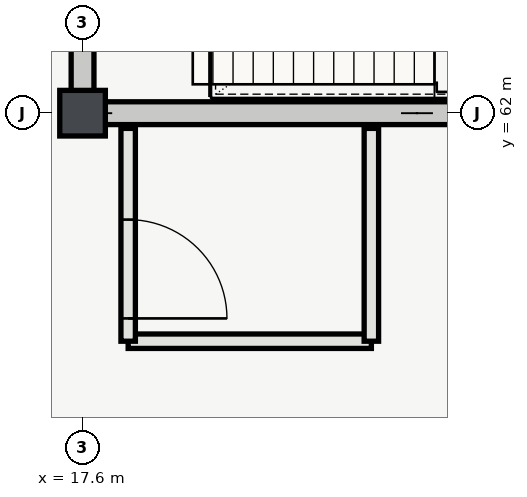
"""IFC4 building model, lengths in metres.
Left out: names, types, materials, properties, quantities, classifications, styles, units other than length and angle.
Written with IfcOpenShell. Run it as: python <this file> out.ifc"""

import sys

from ifc_helpers import new_model, si_unit, direction, frame, frame_2d, origin, origin_2d, place, context, subcontext, project, spatial, rectangle, extrude, element, fill, save


model = new_model("IFC4")
c1 = context("Model", 3, precision=1e-05, world=origin(), true_north=direction((0.0, 1.0)))
c2 = subcontext(c1, "Body", "Model", "MODEL_VIEW")
j1 = project(units=[si_unit("LENGTHUNIT", "METRE"), si_unit("PLANEANGLEUNIT", "RADIAN")], contexts=[c1])
p1 = place(None, origin())
s1 = spatial("IfcSite", under=j1, at=p1, CompositionType="ELEMENT")
p2 = place(p1, origin())
s2 = spatial("IfcBuilding", under=s1, at=p2, CompositionType="ELEMENT")
p3 = place(p2, frame((0.0, 0.0, 33.0)))
s3 = spatial("IfcBuildingStorey", under=s2, at=p3, CompositionType="ELEMENT", Elevation=33.0)
p4 = place(p3, frame((17.6, 62.0, 0.0), z_axis=(0.0, 0.0, 1.0), x_axis=(1.0, 0.0, 0.0)))
e1 = element("IfcColumn", 1, at=p4, inside=s3, PredefinedType="COLUMN", context=c2, shape_type="SweptSolid", body=[
    extrude(rectangle(XDim=0.6, YDim=0.6, at=origin_2d()), origin(), (0.0, 0.0, 1.0), 4.2),
])
p5 = place(p3, frame((17.45, 62.0, 0.0), z_axis=(0.0, 0.0, 1.0), x_axis=(1.0, 0.0, 0.0)))
e2 = element("IfcWall", 2, at=p5, inside=s3, PredefinedType="SHEAR", context=c2, shape_type="SweptSolid", body=[
    extrude(rectangle(XDim=9.1, YDim=0.3, at=frame_2d((4.55, 0.0))), origin(), (0.0, 0.0, 1.0), 3.92),
])
p6 = place(p3, frame((17.6, 62.15, 0.0), z_axis=(0.0, 0.0, 1.0), x_axis=(0.0, 1.0, 0.0)))
e3 = element("IfcWall", 3, at=p6, inside=s3, PredefinedType="SHEAR", context=c2, shape_type="SweptSolid", body=[
    extrude(rectangle(XDim=7.7, YDim=0.3, at=frame_2d((3.85, 0.0))), origin(), (0.0, 0.0, 1.0), 3.92),
])
p7 = place(p6, frame((1.675, 0.0, 0.0)))
e4 = element("IfcOpeningElement", 4, at=p7, cuts=e3, PredefinedType="OPENING", context=c2, shape_type="SweptSolid", body=[
    extrude(rectangle(XDim=1.35, YDim=2.2, at=frame_2d((0.675, 1.1))), frame((0.0, 0.16, 0.0), z_axis=(0.0, -1.0, 0.0), x_axis=(1.0, 0.0, 0.0)), (0.0, 0.0, 1.0), 0.32),
])
p8 = place(p6, frame((5.7, 0.0, 0.0)))
e5 = element("IfcOpeningElement", 5, at=p8, cuts=e3, PredefinedType="OPENING", context=c2, shape_type="SweptSolid", body=[
    extrude(rectangle(XDim=1.0, YDim=2.15, at=frame_2d((0.5, 1.075))), frame((0.0, 0.16, 0.0), z_axis=(0.0, -1.0, 0.0), x_axis=(1.0, 0.0, 0.0)), (0.0, 0.0, 1.0), 0.32),
])
p9 = place(p3, frame((18.2, 59.0, 0.0), z_axis=(0.0, 0.0, 1.0), x_axis=(1.0, 0.0, 0.0)))
e6 = element("IfcWall", 6, at=p9, inside=s3, PredefinedType="PARTITIONING", context=c2, shape_type="SweptSolid", body=[
    extrude(rectangle(XDim=3.2, YDim=0.19, at=frame_2d((1.6, 0.0))), origin(), (0.0, 0.0, 1.0), 3.92),
])
p10 = place(p3, frame((18.2, 61.8, 0.0), z_axis=(0.0, 0.0, 1.0), x_axis=(0.0, -1.0, 0.0)))
e7 = element("IfcWall", 7, at=p10, inside=s3, PredefinedType="PARTITIONING", context=c2, shape_type="SweptSolid", body=[
    extrude(rectangle(XDim=2.8, YDim=0.19, at=frame_2d((1.4, 0.0))), origin(), (0.0, 0.0, 1.0), 3.92),
])
p11 = place(p10, frame((1.2, 0.0, 0.0)))
e8 = element("IfcOpeningElement", 8, at=p11, cuts=e7, PredefinedType="OPENING", context=c2, shape_type="SweptSolid", body=[
    extrude(rectangle(XDim=1.3, YDim=2.2, at=frame_2d((0.65, 1.1))), frame((0.0, 0.105, 0.0), z_axis=(0.0, -1.0, 0.0), x_axis=(1.0, 0.0, 0.0)), (0.0, 0.0, 1.0), 0.21),
])
p12 = place(p3, frame((21.4, 59.0, 0.0), z_axis=(0.0, 0.0, 1.0), x_axis=(0.0, 1.0, 0.0)))
e9 = element("IfcWall", 9, at=p12, inside=s3, PredefinedType="PARTITIONING", context=c2, shape_type="SweptSolid", body=[
    extrude(rectangle(XDim=2.8, YDim=0.19, at=frame_2d((1.4, 0.0))), origin(), (0.0, 0.0, 1.0), 3.92),
])
p13 = place(p11, origin())
e10 = element("IfcDoor", 10, at=p13, inside=s3, OperationType="SINGLE_SWING_RIGHT", PredefinedType="DOOR", context=c2, shape_type="SweptSolid", body=[
    extrude(rectangle(XDim=1.3, YDim=2.2, at=frame_2d((0.65, 1.1))), frame((0.0, 0.025, 0.0), z_axis=(0.0, -1.0, 0.0), x_axis=(1.0, 0.0, 0.0)), (0.0, 0.0, 1.0), 0.05),
])
fill(e8, e10)
save(model, sys.argv[1])
